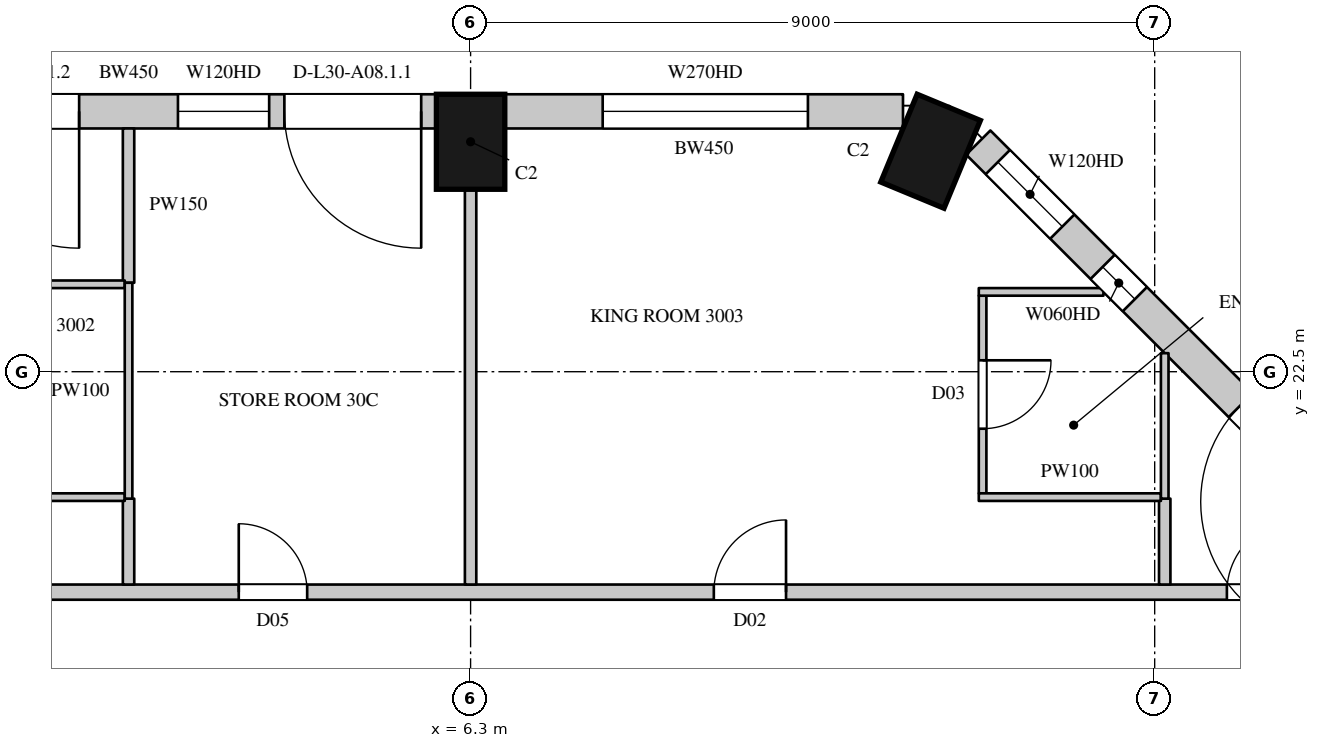
"""IFC4 building model, lengths in metres.
Left out: names, types, materials, properties, quantities, classifications, styles, units other than length and angle.
Written with IfcOpenShell. Run it as: python <this file> out.ifc"""

import sys

from ifc_helpers import new_model, si_unit, direction, frame, frame_2d, origin, origin_2d, place, context, subcontext, project, spatial, rectangle, extrude, element, fill, save


model = new_model("IFC4")
c1 = context("Model", 3, precision=1e-05, world=origin(), true_north=direction((0.0, 1.0)))
c2 = subcontext(c1, "Body", "Model", "MODEL_VIEW")
j1 = project(units=[si_unit("LENGTHUNIT", "METRE"), si_unit("PLANEANGLEUNIT", "RADIAN")], contexts=[c1])
p1 = place(None, origin())
s1 = spatial("IfcSite", under=j1, at=p1, CompositionType="ELEMENT")
p2 = place(p1, origin())
s2 = spatial("IfcBuilding", under=s1, at=p2, CompositionType="ELEMENT")
p3 = place(p2, frame((0.0, 0.0, 138.3)))
s3 = spatial("IfcBuildingStorey", under=s2, at=p3, CompositionType="ELEMENT", Elevation=138.3)
for number, where, z_axis, x_axis in (
    (1, (12.352, 25.4, 0.0), (0.0, 0.0, 1.0), (-0.924, 0.383, 0.0)),
    (2, (6.3, 25.525, 0.0), (0.0, 0.0, 1.0), (-1.0, 0.0, 0.0)),
):
    element("IfcColumn", number, at=place(p3, frame(where, z_axis=z_axis, x_axis=x_axis)), inside=s3, PredefinedType="COLUMN", context=c2, shape_type="SweptSolid", body=[
        extrude(rectangle(XDim=0.9, YDim=1.25, at=origin_2d()), origin(), (0.0, 0.0, 1.0), 3.6),
    ])
p4 = place(p3, frame((18.229, 20.265, 0.0), z_axis=(0.0, 0.0, 1.0), x_axis=(-0.707106781187, 0.707106781187, 0.0)))
e3 = element("IfcWall", 3, at=p4, inside=s3, PredefinedType="SOLIDWALL", context=c2, shape_type="SweptSolid", body=[
    extrude(rectangle(XDim=7.424, YDim=0.45, at=frame_2d((3.712, 0.0))), origin(), (0.0, 0.0, 1.0), 3.3),
])
p5 = place(p4, frame((0.74, 0.0, 0.0)))
e4 = element("IfcOpeningElement", 4, at=p5, cuts=e3, PredefinedType="OPENING", context=c2, shape_type="SweptSolid", body=[
    extrude(rectangle(XDim=1.8, YDim=2.4, at=frame_2d((0.9, 1.2))), frame((0.0, 0.235, 0.0), z_axis=(0.0, -1.0, 0.0), x_axis=(1.0, 0.0, 0.0)), (0.0, 0.0, 1.0), 0.47),
])
p6 = place(p4, frame((4.51, 0.0, 1.05)))
e5 = element("IfcOpeningElement", 5, at=p6, cuts=e3, PredefinedType="OPENING", context=c2, shape_type="SweptSolid", body=[
    extrude(rectangle(XDim=0.6, YDim=2.0, at=frame_2d((0.3, 1.0))), frame((0.0, 0.235, 0.0), z_axis=(0.0, -1.0, 0.0), x_axis=(1.0, 0.0, 0.0)), (0.0, 0.0, 1.0), 0.47),
])
p7 = place(p4, frame((5.861, 0.0, 1.05)))
e6 = element("IfcOpeningElement", 6, at=p7, cuts=e3, PredefinedType="OPENING", context=c2, shape_type="SweptSolid", body=[
    extrude(rectangle(XDim=1.2, YDim=2.0, at=frame_2d((0.6, 1.0))), frame((0.0, 0.235, 0.0), z_axis=(0.0, -1.0, 0.0), x_axis=(1.0, 0.0, 0.0)), (0.0, 0.0, 1.0), 0.47),
])
p8 = place(p3, frame((11.989, 25.925, 0.0), z_axis=(0.0, 0.0, 1.0), x_axis=(-1.0, 0.0, 0.0)))
e7 = element("IfcWall", 7, at=p8, inside=s3, PredefinedType="SOLIDWALL", context=c2, shape_type="SweptSolid", body=[
    extrude(rectangle(XDim=5.239, YDim=0.45, at=frame_2d((2.619, 0.0))), origin(), (0.0, 0.0, 1.0), 3.3),
])
p9 = place(p8, frame((1.251, 0.0, 1.05)))
e8 = element("IfcOpeningElement", 8, at=p9, cuts=e7, PredefinedType="OPENING", context=c2, shape_type="SweptSolid", body=[
    extrude(rectangle(XDim=2.7, YDim=2.0, at=frame_2d((1.35, 1.0))), frame((0.0, 0.235, 0.0), z_axis=(0.0, -1.0, 0.0), x_axis=(1.0, 0.0, 0.0)), (0.0, 0.0, 1.0), 0.47),
])
p10 = place(p3, frame((5.85, 25.925, 0.0), z_axis=(0.0, 0.0, 1.0), x_axis=(-1.0, 0.0, 0.0)))
e9 = element("IfcWall", 9, at=p10, inside=s3, PredefinedType="SOLIDWALL", context=c2, shape_type="SweptSolid", body=[
    extrude(rectangle(XDim=8.1, YDim=0.45, at=frame_2d((4.05, 0.0))), origin(), (0.0, 0.0, 1.0), 3.3),
])
p11 = place(p10, frame((0.2, 0.0, 0.0)))
e10 = element("IfcOpeningElement", 10, at=p11, cuts=e9, PredefinedType="OPENING", context=c2, shape_type="SweptSolid", body=[
    extrude(rectangle(XDim=1.8, YDim=2.4, at=frame_2d((0.9, 1.2))), frame((0.0, 0.235, 0.0), z_axis=(0.0, -1.0, 0.0), x_axis=(1.0, 0.0, 0.0)), (0.0, 0.0, 1.0), 0.47),
])
p12 = place(p10, frame((2.2, 0.0, 1.05)))
e11 = element("IfcOpeningElement", 11, at=p12, cuts=e9, PredefinedType="OPENING", context=c2, shape_type="SweptSolid", body=[
    extrude(rectangle(XDim=1.2, YDim=2.0, at=frame_2d((0.6, 1.0))), frame((0.0, 0.235, 0.0), z_axis=(0.0, -1.0, 0.0), x_axis=(1.0, 0.0, 0.0)), (0.0, 0.0, 1.0), 0.47),
])
p13 = place(p10, frame((4.7, 0.0, 0.0)))
e12 = element("IfcOpeningElement", 12, at=p13, cuts=e9, PredefinedType="OPENING", context=c2, shape_type="SweptSolid", body=[
    extrude(rectangle(XDim=1.8, YDim=2.4, at=frame_2d((0.9, 1.2))), frame((0.0, 0.235, 0.0), z_axis=(0.0, -1.0, 0.0), x_axis=(1.0, 0.0, 0.0)), (0.0, 0.0, 1.0), 0.47),
])
p14 = place(p10, frame((6.7, 0.0, 1.05)))
e13 = element("IfcOpeningElement", 13, at=p14, cuts=e9, PredefinedType="OPENING", context=c2, shape_type="SweptSolid", body=[
    extrude(rectangle(XDim=1.2, YDim=2.0, at=frame_2d((0.6, 1.0))), frame((0.0, 0.235, 0.0), z_axis=(0.0, -1.0, 0.0), x_axis=(1.0, 0.0, 0.0)), (0.0, 0.0, 1.0), 0.47),
])
p15 = place(p3, frame((16.486, 23.529, 0.0), z_axis=(0.0, 0.0, 1.0), x_axis=(-0.707022305137, 0.707191247145, 0.0)))
e14 = element("IfcWall", 14, at=p15, inside=s3, PredefinedType="SOLIDWALL", context=c2, shape_type="SweptSolid", body=[
    extrude(rectangle(XDim=1.445, YDim=0.45, at=frame_2d((0.723, 0.0))), origin(), (0.0, 0.0, 1.0), 0.6),
])
p16 = place(p3, frame((-20.7, 19.6, 0.0), z_axis=(0.0, 0.0, 1.0), x_axis=(1.0, 0.0, 0.0)))
e15 = element("IfcWall", 15, at=p16, inside=s3, PredefinedType="PARTITIONING", context=c2, shape_type="SweptSolid", body=[
    extrude(rectangle(XDim=38.214, YDim=0.2, at=frame_2d((19.107, 0.0))), origin(), (0.0, 0.0, 1.0), 3.3),
])
p17 = place(p16, frame((23.95, 0.0, 0.0)))
e16 = element("IfcOpeningElement", 16, at=p17, cuts=e15, PredefinedType="OPENING", context=c2, shape_type="SweptSolid", body=[
    extrude(rectangle(XDim=0.9, YDim=2.2, at=frame_2d((0.45, 1.1))), frame((0.0, 0.11, 0.0), z_axis=(0.0, -1.0, 0.0), x_axis=(1.0, 0.0, 0.0)), (0.0, 0.0, 1.0), 0.22),
])
p18 = place(p16, frame((2.05, 0.0, 0.0)))
e17 = element("IfcOpeningElement", 17, at=p18, cuts=e15, PredefinedType="OPENING", context=c2, shape_type="SweptSolid", body=[
    extrude(rectangle(XDim=1.1, YDim=2.4, at=frame_2d((0.55, 1.2))), frame((0.0, 0.11, 0.0), z_axis=(0.0, -1.0, 0.0), x_axis=(1.0, 0.0, 0.0)), (0.0, 0.0, 1.0), 0.22),
])
p19 = place(p16, frame((12.15, 0.0, 0.0)))
e18 = element("IfcOpeningElement", 18, at=p19, cuts=e15, PredefinedType="OPENING", context=c2, shape_type="SweptSolid", body=[
    extrude(rectangle(XDim=1.1, YDim=2.4, at=frame_2d((0.55, 1.2))), frame((0.0, 0.11, 0.0), z_axis=(0.0, -1.0, 0.0), x_axis=(1.0, 0.0, 0.0)), (0.0, 0.0, 1.0), 0.22),
])
p20 = place(p16, frame((30.2, 0.0, 0.0)))
e19 = element("IfcOpeningElement", 19, at=p20, cuts=e15, PredefinedType="OPENING", context=c2, shape_type="SweptSolid", body=[
    extrude(rectangle(XDim=0.95, YDim=2.2, at=frame_2d((0.475, 1.1))), frame((0.0, 0.11, 0.0), z_axis=(0.0, -1.0, 0.0), x_axis=(1.0, 0.0, 0.0)), (0.0, 0.0, 1.0), 0.22),
])
p21 = place(p16, frame((36.95, 0.0, 0.0)))
e20 = element("IfcOpeningElement", 20, at=p21, cuts=e15, PredefinedType="OPENING", context=c2, shape_type="SweptSolid", body=[
    extrude(rectangle(XDim=0.95, YDim=2.2, at=frame_2d((0.475, 1.1))), frame((0.0, 0.11, 0.0), z_axis=(0.0, -1.0, 0.0), x_axis=(1.0, 0.0, 0.0)), (0.0, 0.0, 1.0), 0.22),
])
p22 = place(p3, frame((1.8, 19.7, 0.0), z_axis=(0.0, 0.0, 1.0), x_axis=(0.0, 1.0, 0.0)))
e21 = element("IfcWall", 21, at=p22, inside=s3, PredefinedType="PARTITIONING", context=c2, shape_type="SweptSolid", body=[
    extrude(rectangle(XDim=1.13, YDim=0.15, at=frame_2d((0.565, 0.0))), origin(), (0.0, 0.0, 1.0), 2.65),
])
p23 = place(p3, frame((1.8, 23.67, 0.0), z_axis=(0.0, 0.0, 1.0), x_axis=(0.0, 1.0, 0.0)))
e22 = element("IfcWall", 22, at=p23, inside=s3, PredefinedType="PARTITIONING", context=c2, shape_type="SweptSolid", body=[
    extrude(rectangle(XDim=2.03, YDim=0.15, at=frame_2d((1.015, 0.0))), origin(), (0.0, 0.0, 1.0), 2.65),
])
p24 = place(p3, frame((6.3, 19.7, 0.0), z_axis=(0.0, 0.0, 1.0), x_axis=(0.0, 1.0, 0.0)))
e23 = element("IfcWall", 23, at=p24, inside=s3, PredefinedType="PARTITIONING", context=c2, shape_type="SweptSolid", body=[
    extrude(rectangle(XDim=5.2, YDim=0.15, at=frame_2d((2.6, 0.0))), origin(), (0.0, 0.0, 1.0), 2.75),
])
p25 = place(p3, frame((15.432, 19.7, 0.0), z_axis=(0.0, 0.0, 1.0), x_axis=(0.0, 1.0, 0.0)))
e24 = element("IfcWall", 24, at=p25, inside=s3, PredefinedType="PARTITIONING", context=c2, shape_type="SweptSolid", body=[
    extrude(rectangle(XDim=1.13, YDim=0.15, at=frame_2d((0.565, 0.0))), origin(), (0.0, 0.0, 1.0), 3.3),
])
for number, where, z_axis, x_axis in (
    (25, (-0.846, 20.85, 0.0), (0.0, 0.0, 1.0), (1.0, 0.0, 0.0)),
    (26, (-0.846, 23.65, 0.0), (0.0, 0.0, 1.0), (1.0, 0.0, 0.0)),
):
    element("IfcWall", number, at=place(p3, frame(where, z_axis=z_axis, x_axis=x_axis)), inside=s3, PredefinedType="PARTITIONING", context=c2, shape_type="SweptSolid", body=[
        extrude(rectangle(XDim=2.596, YDim=0.1, at=frame_2d((1.298, 0.0))), origin(), (0.0, 0.0, 1.0), 3.3),
    ])
p26 = place(p3, frame((1.8, 20.83, 0.0), z_axis=(0.0, 0.0, 1.0), x_axis=(0.0, 1.0, 0.0)))
e27 = element("IfcWall", 27, at=p26, inside=s3, PredefinedType="PARTITIONING", context=c2, shape_type="SweptSolid", body=[
    extrude(rectangle(XDim=2.84, YDim=0.1, at=frame_2d((1.42, 0.0))), origin(), (0.0, 0.0, 1.0), 2.65),
])
p27 = place(p3, frame((13.036, 20.9, 0.0), z_axis=(0.0, 0.0, 1.0), x_axis=(0.0, 1.0, 0.0)))
e28 = element("IfcWall", 28, at=p27, inside=s3, PredefinedType="PARTITIONING", context=c2, shape_type="SweptSolid", body=[
    extrude(rectangle(XDim=2.6, YDim=0.1, at=frame_2d((1.3, 0.0))), origin(), (0.0, 0.0, 1.0), 3.3),
])
p28 = place(p27, frame((0.85, 0.0, 0.0)))
e29 = element("IfcOpeningElement", 29, at=p28, cuts=e28, PredefinedType="OPENING", context=c2, shape_type="SweptSolid", body=[
    extrude(rectangle(XDim=0.9, YDim=2.2, at=frame_2d((0.45, 1.1))), frame((0.0, 0.06, 0.0), z_axis=(0.0, -1.0, 0.0), x_axis=(1.0, 0.0, 0.0)), (0.0, 0.0, 1.0), 0.12),
])
p29 = place(p3, frame((12.986, 20.85, 0.0), z_axis=(0.0, 0.0, 1.0), x_axis=(1.0, 0.0, 0.0)))
e30 = element("IfcWall", 30, at=p29, inside=s3, PredefinedType="PARTITIONING", context=c2, shape_type="SweptSolid", body=[
    extrude(rectangle(XDim=2.396, YDim=0.1, at=frame_2d((1.198, 0.0))), origin(), (0.0, 0.0, 1.0), 3.3),
])
p30 = place(p3, frame((12.986, 23.55, 0.0), z_axis=(0.0, 0.0, 1.0), x_axis=(1.0, 0.0, 0.0)))
e31 = element("IfcWall", 31, at=p30, inside=s3, PredefinedType="PARTITIONING", context=c2, shape_type="SweptSolid", body=[
    extrude(rectangle(XDim=1.64, YDim=0.1, at=frame_2d((0.82, 0.0))), origin(), (0.0, 0.0, 1.0), 3.3),
])
p31 = place(p3, frame((15.432, 20.83, 0.0), z_axis=(0.0, 0.0, 1.0), x_axis=(0.0, 1.0, 0.0)))
e32 = element("IfcWall", 32, at=p31, inside=s3, PredefinedType="PARTITIONING", context=c2, shape_type="SweptSolid", body=[
    extrude(rectangle(XDim=1.914, YDim=0.1, at=frame_2d((0.957, 0.0))), origin(), (0.0, 0.0, 1.0), 3.3),
])
p32 = place(p5, origin())
e33 = element("IfcDoor", 33, at=p32, inside=s3, OperationType="SLIDING_TO_LEFT", PredefinedType="DOOR", context=c2, shape_type="SweptSolid", body=[
    extrude(rectangle(XDim=1.8, YDim=2.4, at=frame_2d((0.9, 1.2))), frame((0.0, 0.13, 0.0), z_axis=(0.0, -1.0, 0.0), x_axis=(1.0, 0.0, 0.0)), (0.0, 0.0, 1.0), 0.05),
])
fill(e4, e33)
p33 = place(p9, origin())
e34 = element("IfcWindow", 34, at=p33, inside=s3, PartitioningType="SINGLE_PANEL", PredefinedType="WINDOW", context=c2, shape_type="SweptSolid", body=[
    extrude(rectangle(XDim=2.7, YDim=2.0, at=frame_2d((1.35, 1.0))), frame((0.0, 0.135, 0.0), z_axis=(0.0, -1.0, 0.0), x_axis=(1.0, 0.0, 0.0)), (0.0, 0.0, 1.0), 0.06),
])
fill(e8, e34)
p34 = place(p11, origin())
e35 = element("IfcDoor", 35, at=p34, inside=s3, OperationType="SLIDING_TO_LEFT", PredefinedType="DOOR", context=c2, shape_type="SweptSolid", body=[
    extrude(rectangle(XDim=1.8, YDim=2.4, at=frame_2d((0.9, 1.2))), frame((0.0, 0.13, 0.0), z_axis=(0.0, -1.0, 0.0), x_axis=(1.0, 0.0, 0.0)), (0.0, 0.0, 1.0), 0.05),
])
fill(e10, e35)
p35 = place(p12, origin())
e36 = element("IfcWindow", 36, at=p35, inside=s3, PartitioningType="SINGLE_PANEL", PredefinedType="WINDOW", context=c2, shape_type="SweptSolid", body=[
    extrude(rectangle(XDim=1.2, YDim=2.0, at=frame_2d((0.6, 1.0))), frame((0.0, 0.135, 0.0), z_axis=(0.0, -1.0, 0.0), x_axis=(1.0, 0.0, 0.0)), (0.0, 0.0, 1.0), 0.06),
])
fill(e11, e36)
p36 = place(p13, origin())
e37 = element("IfcDoor", 37, at=p36, inside=s3, OperationType="SLIDING_TO_LEFT", PredefinedType="DOOR", context=c2, shape_type="SweptSolid", body=[
    extrude(rectangle(XDim=1.8, YDim=2.4, at=frame_2d((0.9, 1.2))), frame((0.0, 0.13, 0.0), z_axis=(0.0, -1.0, 0.0), x_axis=(1.0, 0.0, 0.0)), (0.0, 0.0, 1.0), 0.05),
])
fill(e12, e37)
p37 = place(p17, origin())
e38 = element("IfcDoor", 38, at=p37, inside=s3, OperationType="SINGLE_SWING_LEFT", PredefinedType="DOOR", context=c2, shape_type="SweptSolid", body=[
    extrude(rectangle(XDim=0.9, YDim=2.2, at=frame_2d((0.45, 1.1))), frame((0.0, 0.025, 0.0), z_axis=(0.0, -1.0, 0.0), x_axis=(1.0, 0.0, 0.0)), (0.0, 0.0, 1.0), 0.05),
])
fill(e16, e38)
p38 = place(p20, origin())
e39 = element("IfcDoor", 39, at=p38, inside=s3, OperationType="SINGLE_SWING_RIGHT", PredefinedType="DOOR", context=c2, shape_type="SweptSolid", body=[
    extrude(rectangle(XDim=0.95, YDim=2.2, at=frame_2d((0.475, 1.1))), frame((0.0, 0.025, 0.0), z_axis=(0.0, -1.0, 0.0), x_axis=(1.0, 0.0, 0.0)), (0.0, 0.0, 1.0), 0.05),
])
fill(e19, e39)
p39 = place(p28, origin())
e40 = element("IfcDoor", 40, at=p39, inside=s3, OperationType="SINGLE_SWING_LEFT", PredefinedType="DOOR", context=c2, shape_type="SweptSolid", body=[
    extrude(rectangle(XDim=0.9, YDim=2.2, at=frame_2d((0.45, 1.1))), frame((0.0, 0.025, 0.0), z_axis=(0.0, -1.0, 0.0), x_axis=(1.0, 0.0, 0.0)), (0.0, 0.0, 1.0), 0.05),
])
fill(e29, e40)
p40 = place(p21, origin())
e41 = element("IfcDoor", 41, at=p40, inside=s3, OperationType="SINGLE_SWING_RIGHT", PredefinedType="DOOR", context=c2, shape_type="SweptSolid", body=[
    extrude(rectangle(XDim=0.95, YDim=2.2, at=frame_2d((0.475, 1.1))), frame((0.0, 0.025, 0.0), z_axis=(0.0, -1.0, 0.0), x_axis=(1.0, 0.0, 0.0)), (0.0, 0.0, 1.0), 0.05),
])
fill(e20, e41)
p41 = place(p6, origin())
e42 = element("IfcWindow", 42, at=p41, inside=s3, PartitioningType="SINGLE_PANEL", PredefinedType="WINDOW", context=c2, shape_type="SweptSolid", body=[
    extrude(rectangle(XDim=0.6, YDim=2.0, at=frame_2d((0.3, 1.0))), frame((0.0, 0.135, 0.0), z_axis=(0.0, -1.0, 0.0), x_axis=(1.0, 0.0, 0.0)), (0.0, 0.0, 1.0), 0.06),
])
fill(e5, e42)
p42 = place(p7, origin())
e43 = element("IfcWindow", 43, at=p42, inside=s3, PartitioningType="SINGLE_PANEL", PredefinedType="WINDOW", context=c2, shape_type="SweptSolid", body=[
    extrude(rectangle(XDim=1.2, YDim=2.0, at=frame_2d((0.6, 1.0))), frame((0.0, 0.135, 0.0), z_axis=(0.0, -1.0, 0.0), x_axis=(1.0, 0.0, 0.0)), (0.0, 0.0, 1.0), 0.06),
])
fill(e6, e43)
save(model, sys.argv[1])
